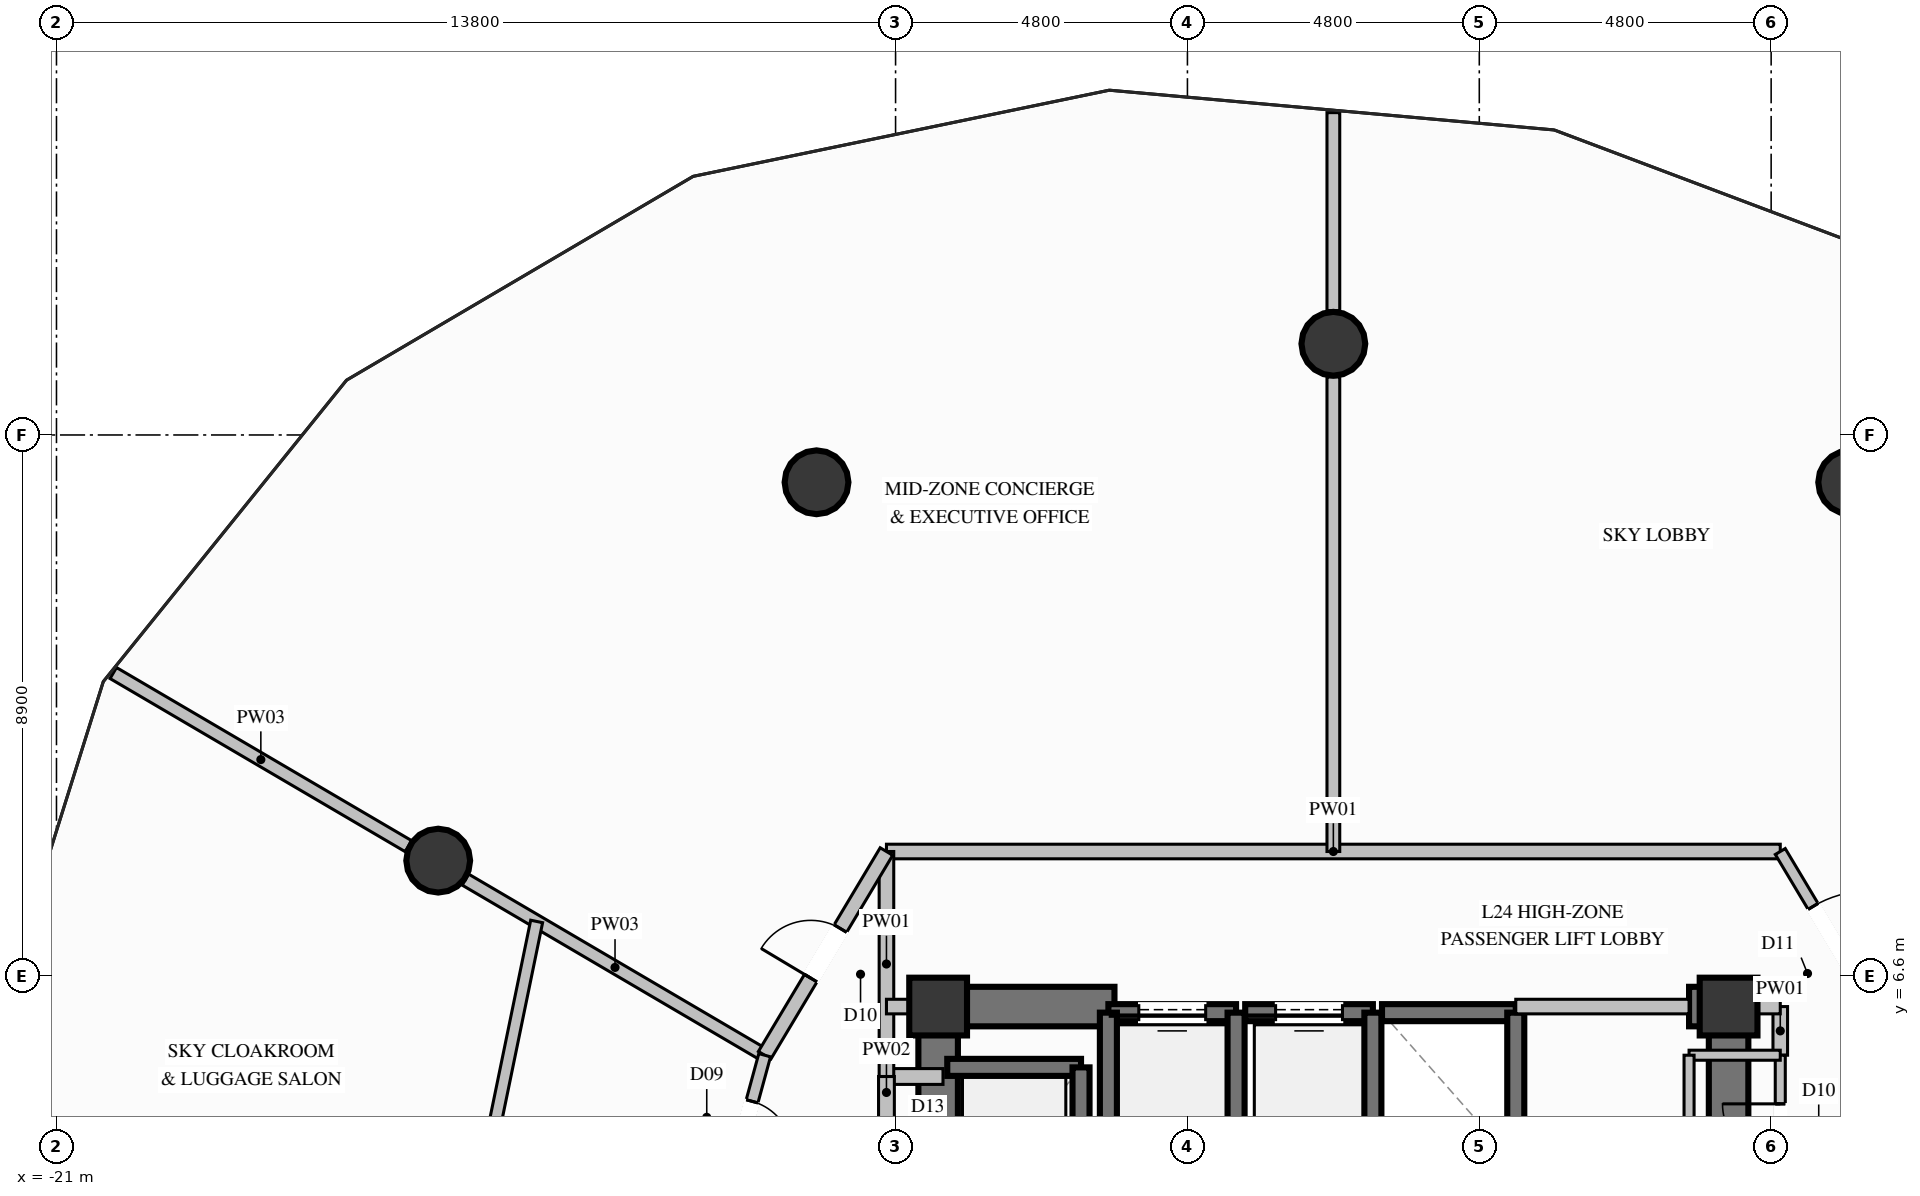
"""IFC4 building model, lengths in metres.
Left out: names, types, materials, properties, quantities, classifications, styles, units other than length and angle.
Written with IfcOpenShell. Run it as: python <this file> out.ifc"""

import sys

from ifc_helpers import new_model, si_unit, direction, frame, frame_2d, origin, origin_2d, place, context, subcontext, project, spatial, rectangle, circle, extrude, element, fill, save


model = new_model("IFC4")
c1 = context("Model", 3, precision=1e-05, world=origin(), true_north=direction((0.0, 1.0)))
c2 = subcontext(c1, "Body", "Model", "MODEL_VIEW")
j1 = project(units=[si_unit("LENGTHUNIT", "METRE"), si_unit("PLANEANGLEUNIT", "RADIAN")], contexts=[c1])
p1 = place(None, origin())
s1 = spatial("IfcSite", under=j1, at=p1, CompositionType="ELEMENT")
p2 = place(p1, origin())
s2 = spatial("IfcBuilding", under=s1, at=p2, CompositionType="ELEMENT")
p3 = place(p2, frame((0.0, 0.0, 98.0)))
s3 = spatial("IfcBuildingStorey", under=s2, at=p3, CompositionType="ELEMENT", Elevation=98.0)
for number, where, z_axis, x_axis in (
    (1, (6.5, 6.1, 0.0), (0.0, 0.0, 1.0), (1.0, 0.0, 0.0)),
    (2, (-6.5, 6.1, 0.0), (0.0, 0.0, 1.0), (1.0, 0.0, 0.0)),
):
    element("IfcColumn", number, at=place(p3, frame(where, z_axis=z_axis, x_axis=x_axis)), inside=s3, PredefinedType="COLUMN", context=c2, shape_type="SweptSolid", body=[
        extrude(rectangle(XDim=0.95, YDim=0.95, at=origin_2d()), origin(), (0.0, 0.0, 1.0), 4.6),
    ])
p4 = place(p3, frame((-6.175, 6.1, 0.0), z_axis=(0.0, 0.0, 1.0), x_axis=(1.0, 0.0, 0.0)))
e3 = element("IfcWall", 3, at=p4, inside=s3, PredefinedType="SHEAR", context=c2, shape_type="SweptSolid", body=[
    extrude(rectangle(XDim=2.575, YDim=0.65, at=frame_2d((1.288, 0.0))), origin(), (0.0, 0.0, 1.0), 4.6),
])
p5 = place(p3, frame((5.85, 6.1, 0.0), z_axis=(0.0, 0.0, 1.0), x_axis=(1.0, 0.0, 0.0)))
e4 = element("IfcWall", 4, at=p5, inside=s3, PredefinedType="SHEAR", context=c2, shape_type="SweptSolid", body=[
    extrude(rectangle(XDim=0.325, YDim=0.65, at=frame_2d((0.163, 0.0))), origin(), (0.0, 0.0, 1.0), 4.6),
])
p6 = place(p3, frame((-6.5, 2.35, 0.0), z_axis=(0.0, 0.0, 1.0), x_axis=(0.0, 1.0, 0.0)))
e5 = element("IfcWall", 5, at=p6, inside=s3, PredefinedType="SHEAR", context=c2, shape_type="SweptSolid", body=[
    extrude(rectangle(XDim=4.075, YDim=0.65, at=frame_2d((2.038, 0.0))), origin(), (0.0, 0.0, 1.0), 4.6),
])
p7 = place(p3, frame((6.5, 3.35, 0.0), z_axis=(0.0, 0.0, 1.0), x_axis=(0.0, 1.0, 0.0)))
e6 = element("IfcWall", 6, at=p7, inside=s3, PredefinedType="SHEAR", context=c2, shape_type="SweptSolid", body=[
    extrude(rectangle(XDim=3.075, YDim=0.65, at=frame_2d((1.538, 0.0))), origin(), (0.0, 0.0, 1.0), 4.6),
])
for number, where, z_axis, x_axis in (
    (7, (8.5, 14.722, 0.0), (0.0, 0.0, 1.0), (1.0, 0.0, 0.0)),
    (8, (0.0, 17.0, 0.0), (0.0, 0.0, 1.0), (1.0, 0.0, 0.0)),
    (9, (-8.5, 14.722, 0.0), (0.0, 0.0, 1.0), (1.0, 0.0, 0.0)),
    (10, (-14.722, 8.5, 0.0), (0.0, 0.0, 1.0), (1.0, 0.0, 0.0)),
):
    element("IfcColumn", number, at=place(p3, frame(where, z_axis=z_axis, x_axis=x_axis)), inside=s3, PredefinedType="COLUMN", context=c2, shape_type="SweptSolid", body=[
        extrude(circle(Radius=0.525, at=origin_2d()), origin(), (0.0, 0.0, 1.0), 4.6),
    ])
p8 = place(p3, frame((-1.6, 6.0, 0.0), z_axis=(0.0, 0.0, 1.0), x_axis=(-1.0, 0.0, 0.0)))
e11 = element("IfcWall", 11, at=p8, inside=s3, PredefinedType="SOLIDWALL", context=c2, shape_type="SweptSolid", body=[
    extrude(rectangle(XDim=2.1, YDim=0.28, at=frame_2d((1.05, 0.0))), origin(), (0.0, 0.0, 1.0), 4.35),
])
p9 = place(p8, frame((0.5, 0.0, 0.0)))
e12 = element("IfcOpeningElement", 12, at=p9, cuts=e11, PredefinedType="OPENING", context=c2, shape_type="SweptSolid", body=[
    extrude(rectangle(XDim=1.1, YDim=2.2, at=frame_2d((0.55, 1.1))), frame((0.0, 0.15, 0.0), z_axis=(0.0, -1.0, 0.0), x_axis=(1.0, 0.0, 0.0)), (0.0, 0.0, 1.0), 0.3),
])
for number, where, z_axis, x_axis in (
    (13, (-3.7, 6.0, 0.0), (0.0, 0.0, 1.0), (0.0, -1.0, 0.0)),
    (14, (-1.6, 3.5, 0.0), (0.0, 0.0, 1.0), (0.0, 1.0, 0.0)),
):
    element("IfcWall", number, at=place(p3, frame(where, z_axis=z_axis, x_axis=x_axis)), inside=s3, PredefinedType="SOLIDWALL", context=c2, shape_type="SweptSolid", body=[
        extrude(rectangle(XDim=2.5, YDim=0.28, at=frame_2d((1.25, 0.0))), origin(), (0.0, 0.0, 1.0), 4.35),
    ])
p10 = place(p3, frame((0.65, 6.0, 0.0), z_axis=(0.0, 0.0, 1.0), x_axis=(-1.0, 0.0, 0.0)))
e15 = element("IfcWall", 15, at=p10, inside=s3, PredefinedType="SOLIDWALL", context=c2, shape_type="SweptSolid", body=[
    extrude(rectangle(XDim=2.1, YDim=0.28, at=frame_2d((1.05, 0.0))), origin(), (0.0, 0.0, 1.0), 4.35),
])
p11 = place(p10, frame((0.5, 0.0, 0.0)))
e16 = element("IfcOpeningElement", 16, at=p11, cuts=e15, PredefinedType="OPENING", context=c2, shape_type="SweptSolid", body=[
    extrude(rectangle(XDim=1.1, YDim=2.2, at=frame_2d((0.55, 1.1))), frame((0.0, 0.15, 0.0), z_axis=(0.0, -1.0, 0.0), x_axis=(1.0, 0.0, 0.0)), (0.0, 0.0, 1.0), 0.3),
])
p12 = place(p3, frame((0.65, 3.5, 0.0), z_axis=(0.0, 0.0, 1.0), x_axis=(0.0, 1.0, 0.0)))
e17 = element("IfcWall", 17, at=p12, inside=s3, PredefinedType="SOLIDWALL", context=c2, shape_type="SweptSolid", body=[
    extrude(rectangle(XDim=2.5, YDim=0.28, at=frame_2d((1.25, 0.0))), origin(), (0.0, 0.0, 1.0), 4.35),
])
p13 = place(p3, frame((3.0, 6.0, 0.0), z_axis=(0.0, 0.0, 1.0), x_axis=(-1.0, 0.0, 0.0)))
e18 = element("IfcWall", 18, at=p13, inside=s3, PredefinedType="SOLIDWALL", context=c2, shape_type="SweptSolid", body=[
    extrude(rectangle(XDim=2.2, YDim=0.28, at=frame_2d((1.1, 0.0))), origin(), (0.0, 0.0, 1.0), 4.35),
])
p14 = place(p3, frame((3.0, 3.5, 0.0), z_axis=(0.0, 0.0, 1.0), x_axis=(0.0, 1.0, 0.0)))
e19 = element("IfcWall", 19, at=p14, inside=s3, PredefinedType="SOLIDWALL", context=c2, shape_type="SweptSolid", body=[
    extrude(rectangle(XDim=2.5, YDim=0.28, at=frame_2d((1.25, 0.0))), origin(), (0.0, 0.0, 1.0), 4.35),
])
p15 = place(p3, frame((-4.15, 5.1, 0.0), z_axis=(0.0, 0.0, 1.0), x_axis=(-1.0, 0.0, 0.0)))
e20 = element("IfcWall", 20, at=p15, inside=s3, PredefinedType="SOLIDWALL", context=c2, shape_type="SweptSolid", body=[
    extrude(rectangle(XDim=2.2, YDim=0.28, at=frame_2d((1.1, 0.0))), origin(), (0.0, 0.0, 1.0), 4.35),
])
p16 = place(p3, frame((-4.15, 2.4, 0.0), z_axis=(0.0, 0.0, 1.0), x_axis=(0.0, 1.0, 0.0)))
e21 = element("IfcWall", 21, at=p16, inside=s3, PredefinedType="SOLIDWALL", context=c2, shape_type="SweptSolid", body=[
    extrude(rectangle(XDim=2.7, YDim=0.28, at=frame_2d((1.35, 0.0))), origin(), (0.0, 0.0, 1.0), 4.35),
])
p17 = place(p3, frame((-7.35, 4.95, 0.0), z_axis=(0.0, 0.0, 1.0), x_axis=(1.0, 0.0, 0.0)))
e22 = element("IfcWall", 22, at=p17, inside=s3, PredefinedType="PARTITIONING", context=c2, shape_type="SweptSolid", body=[
    extrude(rectangle(XDim=0.93, YDim=0.26, at=frame_2d((0.465, 0.0))), origin(), (0.0, 0.0, 1.0), 4.35),
])
p18 = place(p3, frame((-7.35, 2.55, 0.0), z_axis=(0.0, 0.0, 1.0), x_axis=(0.0, 1.0, 0.0)))
e23 = element("IfcWall", 23, at=p18, inside=s3, PredefinedType="PARTITIONING", context=c2, shape_type="SweptSolid", body=[
    extrude(rectangle(XDim=2.4, YDim=0.26, at=frame_2d((1.2, 0.0))), origin(), (0.0, 0.0, 1.0), 3.235),
])
p19 = place(p18, frame((0.775, 0.0, 0.0)))
e24 = element("IfcOpeningElement", 24, at=p19, cuts=e23, PredefinedType="OPENING", context=c2, shape_type="SweptSolid", body=[
    extrude(rectangle(XDim=0.85, YDim=2.05, at=frame_2d((0.425, 1.025))), frame((0.0, 0.14, 0.0), z_axis=(0.0, -1.0, 0.0), x_axis=(1.0, 0.0, 0.0)), (0.0, 0.0, 1.0), 0.28),
])
p20 = place(p3, frame((-7.35, 8.65, 0.0), z_axis=(0.0, 0.0, 1.0), x_axis=(1.0, 0.0, 0.0)))
e25 = element("IfcWall", 25, at=p20, inside=s3, PredefinedType="PARTITIONING", context=c2, shape_type="SweptSolid", body=[
    extrude(rectangle(XDim=14.7, YDim=0.24, at=frame_2d((7.35, 0.0))), origin(), (0.0, 0.0, 1.0), 4.35),
])
p21 = place(p3, frame((3.0, 6.1, 0.0), z_axis=(0.0, 0.0, 1.0), x_axis=(1.0, 0.0, 0.0)))
e26 = element("IfcWall", 26, at=p21, inside=s3, PredefinedType="PARTITIONING", context=c2, shape_type="SweptSolid", body=[
    extrude(rectangle(XDim=2.85, YDim=0.24, at=frame_2d((1.425, 0.0))), origin(), (0.0, 0.0, 1.0), 3.235),
])
p22 = place(p3, frame((7.35, 5.3, 0.0), z_axis=(0.0, 0.0, 1.0), x_axis=(0.0, 1.0, 0.0)))
e27 = element("IfcWall", 27, at=p22, inside=s3, PredefinedType="PARTITIONING", context=c2, shape_type="SweptSolid", body=[
    extrude(rectangle(XDim=0.8, YDim=0.24, at=frame_2d((0.4, 0.0))), origin(), (0.0, 0.0, 1.0), 3.235),
])
p23 = place(p3, frame((6.5, 6.1, 0.0), z_axis=(0.0, 0.0, 1.0), x_axis=(1.0, 0.0, 0.0)))
e28 = element("IfcWall", 28, at=p23, inside=s3, PredefinedType="PARTITIONING", context=c2, shape_type="SweptSolid", body=[
    extrude(rectangle(XDim=0.85, YDim=0.24, at=frame_2d((0.425, 0.0))), origin(), (0.0, 0.0, 1.0), 3.718),
])
p24 = place(p3, frame((-7.35, 4.95, 0.0), z_axis=(0.0, 0.0, 1.0), x_axis=(0.0, 1.0, 0.0)))
e29 = element("IfcWall", 29, at=p24, inside=s3, PredefinedType="PARTITIONING", context=c2, shape_type="SweptSolid", body=[
    extrude(rectangle(XDim=3.7, YDim=0.24, at=frame_2d((1.85, 0.0))), origin(), (0.0, 0.0, 1.0), 3.235),
])
p25 = place(p3, frame((-7.35, 6.1, 0.0), z_axis=(0.0, 0.0, 1.0), x_axis=(1.0, 0.0, 0.0)))
e30 = element("IfcWall", 30, at=p25, inside=s3, PredefinedType="PARTITIONING", context=c2, shape_type="SweptSolid", body=[
    extrude(rectangle(XDim=0.85, YDim=0.24, at=frame_2d((0.425, 0.0))), origin(), (0.0, 0.0, 1.0), 3.718),
])
p26 = place(p3, frame((7.35, 2.75, 0.0), z_axis=(0.0, 0.0, 1.0), x_axis=(0.0, 1.0, 0.0)))
e31 = element("IfcWall", 31, at=p26, inside=s3, PredefinedType="PARTITIONING", context=c2, shape_type="SweptSolid", body=[
    extrude(rectangle(XDim=2.55, YDim=0.165, at=frame_2d((1.275, 0.0))), origin(), (0.0, 0.0, 1.0), 3.235),
])
p27 = place(p26, frame((0.8, 0.0, 0.0)))
e32 = element("IfcOpeningElement", 32, at=p27, cuts=e31, PredefinedType="OPENING", context=c2, shape_type="SweptSolid", body=[
    extrude(rectangle(XDim=0.95, YDim=2.1, at=frame_2d((0.475, 1.05))), frame((0.0, 0.093, 0.0), z_axis=(0.0, -1.0, 0.0), x_axis=(1.0, 0.0, 0.0)), (0.0, 0.0, 1.0), 0.185),
])
p28 = place(p3, frame((7.35, 5.3, 0.0), z_axis=(0.0, 0.0, 1.0), x_axis=(-1.0, 0.0, 0.0)))
e33 = element("IfcWall", 33, at=p28, inside=s3, PredefinedType="PARTITIONING", context=c2, shape_type="SweptSolid", body=[
    extrude(rectangle(XDim=1.5, YDim=0.165, at=frame_2d((0.75, 0.0))), origin(), (0.0, 0.0, 1.0), 3.235),
])
p29 = place(p3, frame((5.85, 5.3, 0.0), z_axis=(0.0, 0.0, 1.0), x_axis=(0.0, -1.0, 0.0)))
e34 = element("IfcWall", 34, at=p29, inside=s3, PredefinedType="PARTITIONING", context=c2, shape_type="SweptSolid", body=[
    extrude(rectangle(XDim=2.55, YDim=0.165, at=frame_2d((1.275, 0.0))), origin(), (0.0, 0.0, 1.0), 3.235),
])
p30 = place(p3, frame((-9.353, 5.3, 0.0), z_axis=(0.0, 0.0, 1.0), x_axis=(-0.86249129364, 0.50607190042, 0.0)))
e35 = element("IfcWall", 35, at=p30, inside=s3, PredefinedType="PARTITIONING", context=c2, shape_type="SweptSolid", body=[
    extrude(rectangle(XDim=5.707, YDim=0.21, at=frame_2d((2.853, 0.0))), origin(), (0.0, 0.0, 1.0), 3.718),
])
p31 = place(p3, frame((-15.212, 8.738, 0.0), z_axis=(0.0, 0.0, 1.0), x_axis=(-0.862583726105, 0.505914336088, 0.0)))
e36 = element("IfcWall", 36, at=p31, inside=s3, PredefinedType="PARTITIONING", context=c2, shape_type="SweptSolid", body=[
    extrude(rectangle(XDim=5.627, YDim=0.21, at=frame_2d((2.813, 0.0))), origin(), (0.0, 0.0, 1.0), 4.35),
])
p32 = place(p3, frame((7.35, 8.65, 0.0), z_axis=(0.0, 0.0, 1.0), x_axis=(0.513179710324, -0.858281180565, 0.0)))
e37 = element("IfcWall", 37, at=p32, inside=s3, PredefinedType="PARTITIONING", context=c2, shape_type="SweptSolid", body=[
    extrude(rectangle(XDim=3.903, YDim=0.19, at=frame_2d((1.952, 0.0))), origin(), (0.0, 0.0, 1.0), 4.35),
])
p33 = place(p32, frame((1.052, 0.0, 0.0)))
e38 = element("IfcOpeningElement", 38, at=p33, cuts=e37, PredefinedType="OPENING", context=c2, shape_type="SweptSolid", body=[
    extrude(rectangle(XDim=1.8, YDim=2.4, at=frame_2d((0.9, 1.2))), frame((0.0, 0.105, 0.0), z_axis=(0.0, -1.0, 0.0), x_axis=(1.0, 0.0, 0.0)), (0.0, 0.0, 1.0), 0.21),
])
p34 = place(p3, frame((0.0, 8.65, 0.0), z_axis=(0.0, 0.0, 1.0), x_axis=(0.0, 1.0, 0.0)))
e39 = element("IfcWall", 39, at=p34, inside=s3, PredefinedType="PARTITIONING", context=c2, shape_type="SweptSolid", body=[
    extrude(rectangle(XDim=7.805, YDim=0.21, at=frame_2d((3.903, 0.0))), origin(), (0.0, 0.0, 1.0), 4.35),
])
p35 = place(p3, frame((0.0, 17.545, 0.0), z_axis=(0.0, 0.0, 1.0), x_axis=(0.0, 1.0, 0.0)))
e40 = element("IfcWall", 40, at=p35, inside=s3, PredefinedType="PARTITIONING", context=c2, shape_type="SweptSolid", body=[
    extrude(rectangle(XDim=3.256, YDim=0.21, at=frame_2d((1.628, 0.0))), origin(), (0.0, 0.0, 1.0), 4.35),
])
p36 = place(p3, frame((-9.353, 5.3, 0.0), z_axis=(0.0, 0.0, 1.0), x_axis=(0.513179710324, 0.858281180565, 0.0)))
e41 = element("IfcWall", 41, at=p36, inside=s3, PredefinedType="PARTITIONING", context=c2, shape_type="SweptSolid", body=[
    extrude(rectangle(XDim=3.903, YDim=0.24, at=frame_2d((1.952, 0.0))), origin(), (0.0, 0.0, 1.0), 4.35),
])
p37 = place(p36, frame((1.477, 0.0, 0.0)))
e42 = element("IfcOpeningElement", 42, at=p37, cuts=e41, PredefinedType="OPENING", context=c2, shape_type="SweptSolid", body=[
    extrude(rectangle(XDim=0.95, YDim=2.1, at=frame_2d((0.475, 1.05))), frame((0.0, 0.13, 0.0), z_axis=(0.0, -1.0, 0.0), x_axis=(1.0, 0.0, 0.0)), (0.0, 0.0, 1.0), 0.26),
])
p38 = place(p3, frame((-9.353, 5.3, 0.0), z_axis=(0.0, 0.0, 1.0), x_axis=(-0.263276167071, -0.964720508672, 0.0)))
e43 = element("IfcWall", 43, at=p38, inside=s3, PredefinedType="PLUMBINGWALL", context=c2, shape_type="SweptSolid", body=[
    extrude(rectangle(XDim=2.472, YDim=0.2, at=frame_2d((1.236, 0.0))), origin(), (0.0, 0.0, 1.0), 4.35),
])
p39 = place(p38, frame((0.786, 0.0, 0.0)))
e44 = element("IfcOpeningElement", 44, at=p39, cuts=e43, PredefinedType="OPENING", context=c2, shape_type="SweptSolid", body=[
    extrude(rectangle(XDim=0.9, YDim=2.1, at=frame_2d((0.45, 1.05))), frame((0.0, 0.11, 0.0), z_axis=(0.0, -1.0, 0.0), x_axis=(1.0, 0.0, 0.0)), (0.0, 0.0, 1.0), 0.22),
])
p40 = place(p3, frame((-13.103, 7.5, 0.0), z_axis=(0.0, 0.0, 1.0), x_axis=(-0.201712893782, -0.979444693937, 0.0)))
e45 = element("IfcWall", 45, at=p40, inside=s3, PredefinedType="PLUMBINGWALL", context=c2, shape_type="SweptSolid", body=[
    extrude(rectangle(XDim=3.446, YDim=0.2, at=frame_2d((1.723, 0.0))), origin(), (0.0, 0.0, 1.0), 4.35),
])
p41 = place(p9, origin())
e46 = element("IfcDoor", 46, at=p41, inside=s3, OperationType="SLIDING_TO_LEFT", PredefinedType="DOOR", context=c2, shape_type="SweptSolid", body=[
    extrude(rectangle(XDim=1.1, YDim=2.2, at=frame_2d((0.55, 1.1))), frame((0.0, 0.025, 0.0), z_axis=(0.0, -1.0, 0.0), x_axis=(1.0, 0.0, 0.0)), (0.0, 0.0, 1.0), 0.05),
])
fill(e12, e46)
p42 = place(p11, origin())
e47 = element("IfcDoor", 47, at=p42, inside=s3, OperationType="SLIDING_TO_LEFT", PredefinedType="DOOR", context=c2, shape_type="SweptSolid", body=[
    extrude(rectangle(XDim=1.1, YDim=2.2, at=frame_2d((0.55, 1.1))), frame((0.0, 0.025, 0.0), z_axis=(0.0, -1.0, 0.0), x_axis=(1.0, 0.0, 0.0)), (0.0, 0.0, 1.0), 0.05),
])
fill(e16, e47)
p43 = place(p27, origin())
e48 = element("IfcDoor", 48, at=p43, inside=s3, OperationType="SINGLE_SWING_RIGHT", PredefinedType="DOOR", context=c2, shape_type="SweptSolid", body=[
    extrude(rectangle(XDim=0.95, YDim=2.1, at=frame_2d((0.475, 1.05))), frame((0.0, 0.025, 0.0), z_axis=(0.0, -1.0, 0.0), x_axis=(1.0, 0.0, 0.0)), (0.0, 0.0, 1.0), 0.05),
])
fill(e32, e48)
p44 = place(p33, origin())
e49 = element("IfcDoor", 49, at=p44, inside=s3, OperationType="SINGLE_SWING_RIGHT", PredefinedType="DOOR", context=c2, shape_type="SweptSolid", body=[
    extrude(rectangle(XDim=1.8, YDim=2.4, at=frame_2d((0.9, 1.2))), frame((0.0, 0.025, 0.0), z_axis=(0.0, -1.0, 0.0), x_axis=(1.0, 0.0, 0.0)), (0.0, 0.0, 1.0), 0.05),
])
fill(e38, e49)
p45 = place(p37, origin())
e50 = element("IfcDoor", 50, at=p45, inside=s3, OperationType="SINGLE_SWING_LEFT", PredefinedType="DOOR", context=c2, shape_type="SweptSolid", body=[
    extrude(rectangle(XDim=0.95, YDim=2.1, at=frame_2d((0.475, 1.05))), frame((0.0, 0.025, 0.0), z_axis=(0.0, -1.0, 0.0), x_axis=(1.0, 0.0, 0.0)), (0.0, 0.0, 1.0), 0.05),
])
fill(e42, e50)
p46 = place(p39, origin())
e51 = element("IfcDoor", 51, at=p46, inside=s3, OperationType="SINGLE_SWING_RIGHT", PredefinedType="DOOR", context=c2, shape_type="SweptSolid", body=[
    extrude(rectangle(XDim=0.9, YDim=2.1, at=frame_2d((0.45, 1.05))), frame((0.0, 0.025, 0.0), z_axis=(0.0, -1.0, 0.0), x_axis=(1.0, 0.0, 0.0)), (0.0, 0.0, 1.0), 0.05),
])
fill(e44, e51)
save(model, sys.argv[1])
